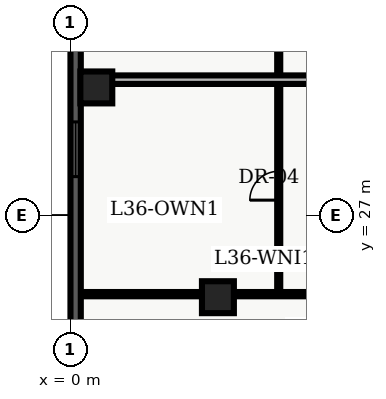
"""IFC4 building model, lengths in metres.
Left out: names, types, materials, properties, quantities, classifications, styles, units other than length and angle.
Written with IfcOpenShell. Run it as: python <this file> out.ifc"""

import sys

from ifc_helpers import new_model, entity, si_unit, converted_unit, direction, frame, origin_with_axes, origin_2d_with_axis, place, context, subcontext, project, spatial, polyline, rectangle, outline, extrude, element, fill, save


model = new_model("IFC4")
c1 = context("Model", 3, precision=1e-05, world=origin_with_axes(), true_north=direction((0.0, 1.0)))
c2 = subcontext(c1, "Body", "Model", "MODEL_VIEW")
j1 = project(units=[si_unit("LENGTHUNIT", "METRE"), converted_unit("PLANEANGLEUNIT", "DEGREE", entity("IfcPlaneAngleMeasure", 0.017), si_unit("PLANEANGLEUNIT", "RADIAN"), dimensions=[0, 0, 0, 0, 0, 0, 0])], contexts=[c1])
p1 = place(None, origin_with_axes())
s1 = spatial("IfcSite", under=j1, at=p1, CompositionType="ELEMENT")
p2 = place(p1, origin_with_axes())
s2 = spatial("IfcBuilding", under=s1, at=p2, CompositionType="ELEMENT")
p3 = place(p2, frame((0.0, 0.0, 148.5), z_axis=(0.0, 0.0, 1.0), x_axis=(1.0, 0.0, 0.0)))
s3 = spatial("IfcBuildingStorey", under=s2, at=p3, CompositionType="ELEMENT", Elevation=148.5)
for number, where, z_axis, x_axis in (
    (1, (4.85, 24.3, 0.0), (0.0, 0.0, 1.0), (1.0, 0.0, 0.0)),
    (2, (0.85, 31.2, 0.0), (0.0, 0.0, 1.0), (1.0, 0.0, 0.0)),
):
    element("IfcColumn", number, at=place(p3, frame(where, z_axis=z_axis, x_axis=x_axis)), inside=s3, PredefinedType="COLUMN", context=c2, shape_type="SweptSolid", body=[
        extrude(rectangle(XDim=1.05, YDim=1.05, at=origin_2d_with_axis()), origin_with_axes(), (0.0, 0.0, 1.0), 3.9),
    ])
p4 = place(p3, frame((0.335, 24.4, 0.0), z_axis=(0.0, 0.0, 1.0), x_axis=(1.0, 0.0, 0.0)))
e3 = element("IfcWall", 3, at=p4, inside=s3, PredefinedType="PARTITIONING", context=c2, shape_type="SweptSolid", body=[
    extrude(outline(polyline([(0.0, -0.07), (9.185, -0.07), (9.185, 0.07), (0.0, 0.07), (0.0, -0.07)])), origin_with_axes(), (0.0, 0.0, 1.0), 2.7),
])
p5 = place(p3, frame((6.85, 24.55, 0.0), z_axis=(0.0, 0.0, 1.0), x_axis=(0.0, 1.0, 0.0)))
e4 = element("IfcWall", 4, at=p5, inside=s3, PredefinedType="PARTITIONING", context=c2, shape_type="SweptSolid", body=[
    extrude(outline(polyline([(0.0, -0.05), (15.75, -0.05), (15.75, 0.05), (0.0, 0.05), (0.0, -0.05)])), origin_with_axes(), (0.0, 0.0, 1.0), 2.7),
])
p6 = place(p5, frame((3.417, 0.0, 0.0), z_axis=(0.0, 0.0, 1.0), x_axis=(1.0, 0.0, 0.0)))
e5 = element("IfcOpeningElement", 5, at=p6, cuts=e4, PredefinedType="OPENING", context=c2, shape_type="SweptSolid", body=[
    extrude(rectangle(XDim=0.95, YDim=0.12, at=origin_2d_with_axis()), origin_with_axes(), (0.0, 0.0, 1.0), 2.15),
])
p7 = place(p5, frame((11.082, 0.0, 0.0), z_axis=(0.0, 0.0, 1.0), x_axis=(1.0, 0.0, 0.0)))
e6 = element("IfcOpeningElement", 6, at=p7, cuts=e4, PredefinedType="OPENING", context=c2, shape_type="SweptSolid", body=[
    extrude(rectangle(XDim=0.95, YDim=0.12, at=origin_2d_with_axis()), origin_with_axes(), (0.0, 0.0, 1.0), 2.15),
])
p8 = place(p3, frame((0.335, 31.455, 0.0), z_axis=(0.0, 0.0, 1.0), x_axis=(1.0, 0.0, 0.0)))
e7 = element("IfcWall", 7, at=p8, inside=s3, PredefinedType="PARTITIONING", context=c2, shape_type="SweptSolid", body=[
    extrude(outline(polyline([(0.0, -0.14), (8.795, -0.14), (8.795, 0.14), (0.0, 0.14), (0.0, -0.14)])), origin_with_axes(), (0.0, 0.0, 1.0), 2.7),
])
p9 = place(p3, frame((0.17, 2.74, 0.0), z_axis=(0.0, 0.0, 1.0), x_axis=(0.0, 1.0, 0.0)))
e8 = element("IfcWall", 8, at=p9, inside=s3, PredefinedType="SOLIDWALL", context=c2, shape_type="SweptSolid", body=[
    extrude(outline(polyline([(0.0, -0.17), (43.46, -0.17), (43.46, 0.17), (0.0, 0.17), (0.0, -0.17)])), origin_with_axes(), (0.0, 0.0, 1.0), 3.66),
])
p10 = place(p9, frame((2.948, 0.0, 0.45), z_axis=(0.0, 0.0, 1.0), x_axis=(1.0, 0.0, 0.0)))
e9 = element("IfcOpeningElement", 9, at=p10, cuts=e8, PredefinedType="OPENING", context=c2, shape_type="SweptSolid", body=[
    extrude(rectangle(XDim=1.8, YDim=0.36, at=origin_2d_with_axis()), origin_with_axes(), (0.0, 0.0, 1.0), 2.1),
])
p11 = place(p9, frame((12.339, 0.0, 0.45), z_axis=(0.0, 0.0, 1.0), x_axis=(1.0, 0.0, 0.0)))
e10 = element("IfcOpeningElement", 10, at=p11, cuts=e8, PredefinedType="OPENING", context=c2, shape_type="SweptSolid", body=[
    extrude(rectangle(XDim=1.8, YDim=0.36, at=origin_2d_with_axis()), origin_with_axes(), (0.0, 0.0, 1.0), 2.1),
])
p12 = place(p9, frame((26.426, 0.0, 0.45), z_axis=(0.0, 0.0, 1.0), x_axis=(1.0, 0.0, 0.0)))
e11 = element("IfcOpeningElement", 11, at=p12, cuts=e8, PredefinedType="OPENING", context=c2, shape_type="SweptSolid", body=[
    extrude(rectangle(XDim=1.8, YDim=0.36, at=origin_2d_with_axis()), origin_with_axes(), (0.0, 0.0, 1.0), 2.1),
])
p13 = place(p9, frame((31.121, 0.0, 0.45), z_axis=(0.0, 0.0, 1.0), x_axis=(1.0, 0.0, 0.0)))
e12 = element("IfcOpeningElement", 12, at=p13, cuts=e8, PredefinedType="OPENING", context=c2, shape_type="SweptSolid", body=[
    extrude(rectangle(XDim=1.8, YDim=0.36, at=origin_2d_with_axis()), origin_with_axes(), (0.0, 0.0, 1.0), 2.1),
])
p14 = place(p9, frame((40.062, 0.0, 0.45), z_axis=(0.0, 0.0, 1.0), x_axis=(1.0, 0.0, 0.0)))
e13 = element("IfcOpeningElement", 13, at=p14, cuts=e8, PredefinedType="OPENING", context=c2, shape_type="SweptSolid", body=[
    extrude(rectangle(XDim=1.8, YDim=0.36, at=origin_2d_with_axis()), origin_with_axes(), (0.0, 0.0, 1.0), 2.1),
])
p15 = place(p5, frame((3.417, 0.0, 0.0), z_axis=(0.0, 0.0, 1.0), x_axis=(1.0, 0.0, 0.0)))
e14 = element("IfcDoor", 14, at=p15, inside=s3, OperationType="SINGLE_SWING_LEFT", PredefinedType="DOOR", context=c2, shape_type="SweptSolid", body=[
    extrude(rectangle(XDim=0.95, YDim=0.06, at=origin_2d_with_axis()), origin_with_axes(), (0.0, 0.0, 1.0), 2.15),
])
fill(e5, e14)
p16 = place(p9, frame((26.426, 0.0, 0.45), z_axis=(0.0, 0.0, 1.0), x_axis=(1.0, 0.0, 0.0)))
e15 = element("IfcWindow", 15, at=p16, inside=s3, PredefinedType="WINDOW", context=c2, shape_type="SweptSolid", body=[
    extrude(rectangle(XDim=1.8, YDim=0.09, at=origin_2d_with_axis()), origin_with_axes(), (0.0, 0.0, 1.0), 2.1),
])
fill(e11, e15)
save(model, sys.argv[1])
